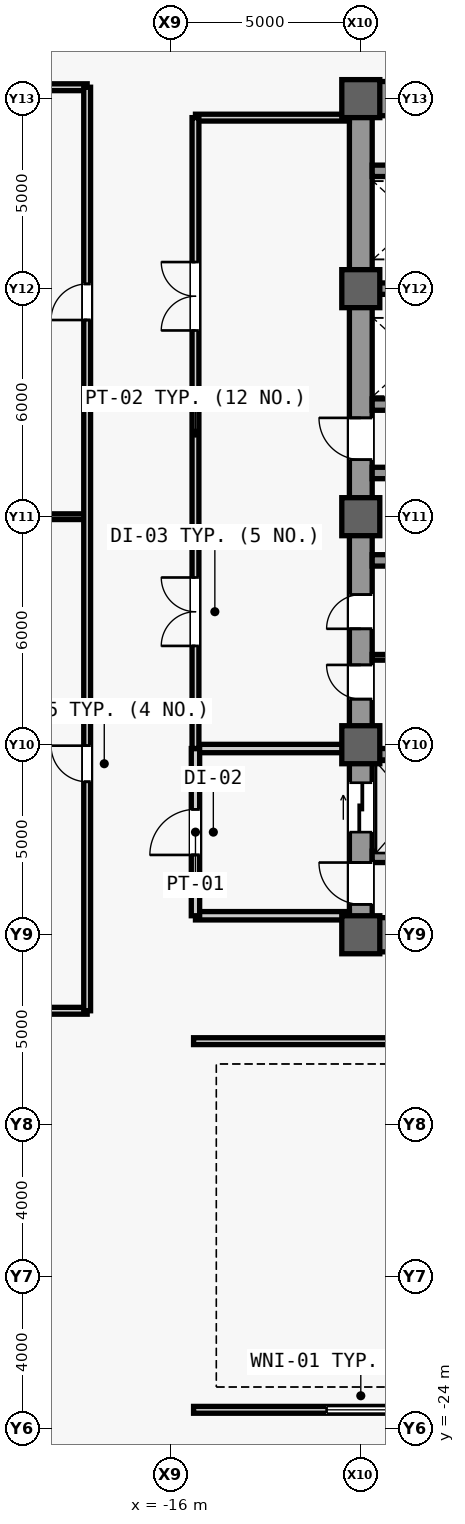
"""IFC4 building model, lengths in metres.
Left out: names, types, materials, properties, quantities, classifications, styles, units other than length and angle.
Written with IfcOpenShell. Run it as: python <this file> out.ifc"""

import sys

from ifc_helpers import new_model, si_unit, direction, frame, frame_2d, origin, origin_2d, place, context, subcontext, project, spatial, rectangle, extrude, source, transform, mapped, element, fill, save


model = new_model("IFC4")
c1 = context("Model", 3, precision=1e-05, world=origin(), true_north=direction((0.0, 1.0)))
c2 = subcontext(c1, "Body", "Model", "MODEL_VIEW")
j1 = project(units=[si_unit("LENGTHUNIT", "METRE"), si_unit("PLANEANGLEUNIT", "RADIAN")], contexts=[c1])
p1 = place(None, origin())
s1 = spatial("IfcSite", under=j1, at=p1, CompositionType="ELEMENT")
p2 = place(p1, origin())
s2 = spatial("IfcBuilding", under=s1, at=p2, CompositionType="ELEMENT")
p3 = place(p2, frame((0.0, 0.0, 17.4)))
s3 = spatial("IfcBuildingStorey", under=s2, at=p3, CompositionType="ELEMENT", Elevation=17.4)
m1 = source(origin(), c2, "Body", "SweptSolid", [
    extrude(rectangle(XDim=22.0, YDim=0.6, at=frame_2d((11.0, 0.0))), origin(), (0.0, 0.0, 1.0), 4.48),
])
p4 = place(p3, frame((-11.0, -11.0, 0.0), z_axis=(0.0, 0.0, 1.0), x_axis=(0.0, 1.0, 0.0)))
e1 = element("IfcWall", 1, at=p4, inside=s3, PredefinedType="SHEAR", context=c2, shape_type="MappedRepresentation", body=[
    mapped(m1, transform((0.0, 0.0, 0.0), scale=1.0)),
])
m2 = source(origin(), c2, "Body", "SweptSolid", [
    extrude(rectangle(XDim=1.1, YDim=2.2, at=frame_2d((0.55, 1.1))), frame((0.0, 0.31, 0.0), z_axis=(0.0, -1.0, 0.0), x_axis=(1.0, 0.0, 0.0)), (0.0, 0.0, 1.0), 0.62),
])
p5 = place(p4, frame((0.8, 0.0, 0.0)))
e2 = element("IfcOpeningElement", 2, at=p5, cuts=e1, PredefinedType="OPENING", context=c2, shape_type="MappedRepresentation", body=[
    mapped(m2, transform((0.0, 0.0, 0.0), scale=1.0)),
])
p6 = place(p4, frame((12.5, 0.0, 0.0)))
e3 = element("IfcOpeningElement", 3, at=p6, cuts=e1, PredefinedType="OPENING", context=c2, shape_type="MappedRepresentation", body=[
    mapped(m2, transform((0.0, 0.0, 0.0), scale=1.0)),
])
m3 = source(origin(), c2, "Body", "SweptSolid", [
    extrude(rectangle(XDim=0.9, YDim=2.15, at=frame_2d((0.45, 1.075))), frame((0.0, 0.31, 0.0), z_axis=(0.0, -1.0, 0.0), x_axis=(1.0, 0.0, 0.0)), (0.0, 0.0, 1.0), 0.62),
])
p7 = place(p4, frame((6.2, 0.0, 0.0)))
e4 = element("IfcOpeningElement", 4, at=p7, cuts=e1, PredefinedType="OPENING", context=c2, shape_type="MappedRepresentation", body=[
    mapped(m3, transform((0.0, 0.0, 0.0), scale=1.0)),
])
p8 = place(p4, frame((8.05, 0.0, 0.0)))
e5 = element("IfcOpeningElement", 5, at=p8, cuts=e1, PredefinedType="OPENING", context=c2, shape_type="MappedRepresentation", body=[
    mapped(m3, transform((0.0, 0.0, 0.0), scale=1.0)),
])
m4 = source(origin(), c2, "Body", "SweptSolid", [
    extrude(rectangle(XDim=1.3, YDim=2.3, at=frame_2d((0.65, 1.15))), frame((0.0, 0.31, 0.0), z_axis=(0.0, -1.0, 0.0), x_axis=(1.0, 0.0, 0.0)), (0.0, 0.0, 1.0), 0.62),
])
p9 = place(p4, frame((2.7, 0.0, 0.0)))
e6 = element("IfcOpeningElement", 6, at=p9, cuts=e1, PredefinedType="OPENING", context=c2, shape_type="MappedRepresentation", body=[
    mapped(m4, transform((0.0, 0.0, 0.0), scale=1.0)),
])
m5 = source(origin(), c2, "Body", "SweptSolid", [
    extrude(rectangle(XDim=5.85, YDim=0.9, at=frame_2d((2.925, 0.0))), origin(), (0.0, 0.0, 1.0), 4.48),
])
for number, where, z_axis, x_axis in (
    (7, (-10.7, -11.0, 0.0), (0.0, 0.0, 1.0), (1.0, 0.0, 0.0)),
    (8, (-10.7, 11.0, 0.0), (0.0, 0.0, 1.0), (1.0, 0.0, 0.0)),
):
    element("IfcWall", number, at=place(p3, frame(where, z_axis=z_axis, x_axis=x_axis)), inside=s3, PredefinedType="SHEAR", context=c2, shape_type="MappedRepresentation", body=[
        mapped(m5, transform((0.0, 0.0, 0.0), scale=1.0)),
    ])
m6 = source(origin(), c2, "Body", "SweptSolid", [
    extrude(rectangle(XDim=5.6, YDim=0.3, at=frame_2d((2.8, 0.0))), origin(), (0.0, 0.0, 1.0), 4.48),
])
for number, where, z_axis, x_axis in (
    (9, (-10.7, -1.15, 0.0), (0.0, 0.0, 1.0), (1.0, 0.0, 0.0)),
    (10, (-10.7, 1.15, 0.0), (0.0, 0.0, 1.0), (1.0, 0.0, 0.0)),
):
    element("IfcWall", number, at=place(p3, frame(where, z_axis=z_axis, x_axis=x_axis)), inside=s3, PredefinedType="SHEAR", context=c2, shape_type="MappedRepresentation", body=[
        mapped(m6, transform((0.0, 0.0, 0.0), scale=1.0)),
    ])
m7 = source(origin(), c2, "Body", "SweptSolid", [
    extrude(rectangle(XDim=1.0, YDim=1.0, at=origin_2d()), origin(), (0.0, 0.0, 1.0), 4.8),
])
for number, where, z_axis, x_axis in (
    (11, (-11.0, -11.0, 0.0), (0.0, 0.0, 1.0), (1.0, 0.0, 0.0)),
    (12, (-11.0, -6.0, 0.0), (0.0, 0.0, 1.0), (1.0, 0.0, 0.0)),
    (13, (-11.0, 0.0, 0.0), (0.0, 0.0, 1.0), (1.0, 0.0, 0.0)),
    (14, (-11.0, 6.0, 0.0), (0.0, 0.0, 1.0), (1.0, 0.0, 0.0)),
    (15, (-11.0, 11.0, 0.0), (0.0, 0.0, 1.0), (1.0, 0.0, 0.0)),
):
    element("IfcColumn", number, at=place(p3, frame(where, z_axis=z_axis, x_axis=x_axis)), inside=s3, PredefinedType="COLUMN", context=c2, shape_type="MappedRepresentation", body=[
        mapped(m7, transform((0.0, 0.0, 0.0), scale=1.0)),
    ])
m8 = source(origin(), c2, "Body", "SweptSolid", [
    extrude(rectangle(XDim=2.2, YDim=0.3, at=frame_2d((1.1, 0.0))), origin(), (0.0, 0.0, 1.0), 4.48),
])
for number, where, z_axis, x_axis in (
    (16, (-10.7, -8.95, 0.0), (0.0, 0.0, 1.0), (1.0, 0.0, 0.0)),
    (17, (-10.7, -6.25, 0.0), (0.0, 0.0, 1.0), (1.0, 0.0, 0.0)),
    (18, (-10.7, 2.95, 0.0), (0.0, 0.0, 1.0), (1.0, 0.0, 0.0)),
    (19, (-10.7, 6.0, 0.0), (0.0, 0.0, 1.0), (1.0, 0.0, 0.0)),
    (20, (-10.7, 9.1, 0.0), (0.0, 0.0, 1.0), (1.0, 0.0, 0.0)),
):
    element("IfcWall", number, at=place(p3, frame(where, z_axis=z_axis, x_axis=x_axis)), inside=s3, PredefinedType="SHEAR", context=c2, shape_type="MappedRepresentation", body=[
        mapped(m8, transform((0.0, 0.0, 0.0), scale=1.0)),
    ])
m9 = source(origin(), c2, "Body", "SweptSolid", [
    extrude(rectangle(XDim=2.05, YDim=0.15, at=frame_2d((1.025, 0.0))), origin(), (0.0, 0.0, 1.0), 4.48),
])
p10 = place(p3, frame((-10.7, -3.7, 0.0), z_axis=(0.0, 0.0, 1.0), x_axis=(1.0, 0.0, 0.0)))
e21 = element("IfcWall", 21, at=p10, inside=s3, PredefinedType="PARTITIONING", context=c2, shape_type="MappedRepresentation", body=[
    mapped(m9, transform((0.0, 0.0, 0.0), scale=1.0)),
])
m10 = source(origin(), c2, "Body", "SweptSolid", [
    extrude(rectangle(XDim=4.05, YDim=0.22, at=frame_2d((2.025, 0.0))), origin(), (0.0, 0.0, 1.0), 4.48),
])
for number, where, z_axis, x_axis in (
    (22, (-15.35, -10.5, 0.0), (0.0, 0.0, 1.0), (1.0, 0.0, 0.0)),
    (23, (-15.35, -6.1, 0.0), (0.0, 0.0, 1.0), (1.0, 0.0, 0.0)),
):
    element("IfcWall", number, at=place(p3, frame(where, z_axis=z_axis, x_axis=x_axis)), inside=s3, PredefinedType="PARTITIONING", context=c2, shape_type="MappedRepresentation", body=[
        mapped(m10, transform((0.0, 0.0, 0.0), scale=1.0)),
    ])
m11 = source(origin(), c2, "Body", "SweptSolid", [
    extrude(rectangle(XDim=4.4, YDim=0.22, at=frame_2d((2.2, 0.0))), origin(), (0.0, 0.0, 1.0), 4.48),
])
p11 = place(p3, frame((-15.35, -10.5, 0.0), z_axis=(0.0, 0.0, 1.0), x_axis=(0.0, 1.0, 0.0)))
e24 = element("IfcWall", 24, at=p11, inside=s3, PredefinedType="PARTITIONING", context=c2, shape_type="MappedRepresentation", body=[
    mapped(m11, transform((0.0, 0.0, 0.0), scale=1.0)),
])
m12 = source(origin(), c2, "Body", "SweptSolid", [
    extrude(rectangle(XDim=1.2, YDim=2.2, at=frame_2d((0.6, 1.1))), frame((0.0, 0.12, 0.0), z_axis=(0.0, -1.0, 0.0), x_axis=(1.0, 0.0, 0.0)), (0.0, 0.0, 1.0), 0.24),
])
p12 = place(p11, frame((1.6, 0.0, 0.0)))
e25 = element("IfcOpeningElement", 25, at=p12, cuts=e24, PredefinedType="OPENING", context=c2, shape_type="MappedRepresentation", body=[
    mapped(m12, transform((0.0, 0.0, 0.0), scale=1.0)),
])
m13 = source(origin(), c2, "Body", "SweptSolid", [
    extrude(rectangle(XDim=4.05, YDim=0.18, at=frame_2d((2.025, 0.0))), origin(), (0.0, 0.0, 1.0), 4.48),
])
p13 = place(p3, frame((-15.35, 10.5, 0.0), z_axis=(0.0, 0.0, 1.0), x_axis=(1.0, 0.0, 0.0)))
e26 = element("IfcWall", 26, at=p13, inside=s3, PredefinedType="PARTITIONING", context=c2, shape_type="MappedRepresentation", body=[
    mapped(m13, transform((0.0, 0.0, 0.0), scale=1.0)),
])
m14 = source(origin(), c2, "Body", "SweptSolid", [
    extrude(rectangle(XDim=16.6, YDim=0.18, at=frame_2d((8.3, 0.0))), origin(), (0.0, 0.0, 1.0), 4.48),
])
p14 = place(p3, frame((-15.35, -6.1, 0.0), z_axis=(0.0, 0.0, 1.0), x_axis=(0.0, 1.0, 0.0)))
e27 = element("IfcWall", 27, at=p14, inside=s3, PredefinedType="PARTITIONING", context=c2, shape_type="MappedRepresentation", body=[
    mapped(m14, transform((0.0, 0.0, 0.0), scale=1.0)),
])
m15 = source(origin(), c2, "Body", "SweptSolid", [
    extrude(rectangle(XDim=1.8, YDim=2.25, at=frame_2d((0.9, 1.125))), frame((0.0, 0.1, 0.0), z_axis=(0.0, -1.0, 0.0), x_axis=(1.0, 0.0, 0.0)), (0.0, 0.0, 1.0), 0.2),
])
p15 = place(p14, frame((2.7, 0.0, 0.0)))
e28 = element("IfcOpeningElement", 28, at=p15, cuts=e27, PredefinedType="OPENING", context=c2, shape_type="MappedRepresentation", body=[
    mapped(m15, transform((0.0, 0.0, 0.0), scale=1.0)),
])
p16 = place(p14, frame((11.0, 0.0, 0.0)))
e29 = element("IfcOpeningElement", 29, at=p16, cuts=e27, PredefinedType="OPENING", context=c2, shape_type="MappedRepresentation", body=[
    mapped(m15, transform((0.0, 0.0, 0.0), scale=1.0)),
])
m16 = source(origin(), c2, "Body", "SweptSolid", [
    extrude(rectangle(XDim=30.8, YDim=0.18, at=frame_2d((15.4, 0.0))), origin(), (0.0, 0.0, 1.0), 4.48),
])
p17 = place(p3, frame((-15.4, -13.8, 0.0), z_axis=(0.0, 0.0, 1.0), x_axis=(1.0, 0.0, 0.0)))
e30 = element("IfcWall", 30, at=p17, inside=s3, PredefinedType="PARTITIONING", context=c2, shape_type="MappedRepresentation", body=[
    mapped(m16, transform((0.0, 0.0, 0.0), scale=1.0)),
])
p18 = place(p17, frame((14.5, 0.0, 0.0)))
e31 = element("IfcOpeningElement", 31, at=p18, cuts=e30, PredefinedType="OPENING", context=c2, shape_type="MappedRepresentation", body=[
    mapped(m15, transform((0.0, 0.0, 0.0), scale=1.0)),
])
p19 = place(p3, frame((-15.4, -23.5, 0.0), z_axis=(0.0, 0.0, 1.0), x_axis=(1.0, 0.0, 0.0)))
e32 = element("IfcWall", 32, at=p19, inside=s3, PredefinedType="PARTITIONING", context=c2, shape_type="MappedRepresentation", body=[
    mapped(m16, transform((0.0, 0.0, 0.0), scale=1.0)),
])
m17 = source(origin(), c2, "Body", "SweptSolid", [
    extrude(rectangle(XDim=1.8, YDim=1.4, at=frame_2d((0.9, 0.7))), frame((0.0, 0.1, 0.0), z_axis=(0.0, -1.0, 0.0), x_axis=(1.0, 0.0, 0.0)), (0.0, 0.0, 1.0), 0.2),
])
p20 = place(p19, frame((3.5, 0.0, 0.9)))
e33 = element("IfcOpeningElement", 33, at=p20, cuts=e32, PredefinedType="OPENING", context=c2, shape_type="MappedRepresentation", body=[
    mapped(m17, transform((0.0, 0.0, 0.0), scale=1.0)),
])
p21 = place(p19, frame((14.5, 0.0, 0.9)))
e34 = element("IfcOpeningElement", 34, at=p21, cuts=e32, PredefinedType="OPENING", context=c2, shape_type="MappedRepresentation", body=[
    mapped(m17, transform((0.0, 0.0, 0.0), scale=1.0)),
])
p22 = place(p19, frame((23.7, 0.0, 0.9)))
e35 = element("IfcOpeningElement", 35, at=p22, cuts=e32, PredefinedType="OPENING", context=c2, shape_type="MappedRepresentation", body=[
    mapped(m17, transform((0.0, 0.0, 0.0), scale=1.0)),
])
m18 = source(origin(), c2, "Body", "SweptSolid", [
    extrude(rectangle(XDim=11.8, YDim=0.18, at=frame_2d((5.9, 0.0))), origin(), (0.0, 0.0, 1.0), 2.68),
])
p23 = place(p3, frame((-30.0, 11.3, 0.0), z_axis=(0.0, 0.0, 1.0), x_axis=(1.0, 0.0, 0.0)))
e36 = element("IfcWall", 36, at=p23, inside=s3, PredefinedType="PARTITIONING", context=c2, shape_type="MappedRepresentation", body=[
    mapped(m18, transform((0.0, 0.0, 0.0), scale=1.0)),
])
m19 = source(origin(), c2, "Body", "SweptSolid", [
    extrude(rectangle(XDim=21.8, YDim=0.18, at=frame_2d((10.9, 0.0))), origin(), (0.0, 0.0, 1.0), 4.48),
])
p24 = place(p3, frame((-40.0, -13.0, 0.0), z_axis=(0.0, 0.0, 1.0), x_axis=(1.0, 0.0, 0.0)))
e37 = element("IfcWall", 37, at=p24, inside=s3, PredefinedType="PARTITIONING", context=c2, shape_type="MappedRepresentation", body=[
    mapped(m19, transform((0.0, 0.0, 0.0), scale=1.0)),
])
m20 = source(origin(), c2, "Body", "SweptSolid", [
    extrude(rectangle(XDim=21.8, YDim=0.15, at=frame_2d((10.9, 0.0))), origin(), (0.0, 0.0, 1.0), 2.68),
])
p25 = place(p3, frame((-40.0, 0.0, 0.0), z_axis=(0.0, 0.0, 1.0), x_axis=(1.0, 0.0, 0.0)))
e38 = element("IfcWall", 38, at=p25, inside=s3, PredefinedType="PARTITIONING", context=c2, shape_type="MappedRepresentation", body=[
    mapped(m20, transform((0.0, 0.0, 0.0), scale=1.0)),
])
m21 = source(origin(), c2, "Body", "SweptSolid", [
    extrude(rectangle(XDim=24.3, YDim=0.18, at=frame_2d((12.15, 0.0))), origin(), (0.0, 0.0, 1.0), 4.48),
])
p26 = place(p3, frame((-18.2, -13.0, 0.0), z_axis=(0.0, 0.0, 1.0), x_axis=(0.0, 1.0, 0.0)))
e39 = element("IfcWall", 39, at=p26, inside=s3, PredefinedType="PARTITIONING", context=c2, shape_type="MappedRepresentation", body=[
    mapped(m21, transform((0.0, 0.0, 0.0), scale=1.0)),
])
m22 = source(origin(), c2, "Body", "SweptSolid", [
    extrude(rectangle(XDim=0.95, YDim=2.15, at=frame_2d((0.475, 1.075))), frame((0.0, 0.1, 0.0), z_axis=(0.0, -1.0, 0.0), x_axis=(1.0, 0.0, 0.0)), (0.0, 0.0, 1.0), 0.2),
])
p27 = place(p26, frame((6.025, 0.0, 0.0)))
e40 = element("IfcOpeningElement", 40, at=p27, cuts=e39, PredefinedType="OPENING", context=c2, shape_type="MappedRepresentation", body=[
    mapped(m22, transform((0.0, 0.0, 0.0), scale=1.0)),
])
p28 = place(p26, frame((18.175, 0.0, 0.0)))
e41 = element("IfcOpeningElement", 41, at=p28, cuts=e39, PredefinedType="OPENING", context=c2, shape_type="MappedRepresentation", body=[
    mapped(m22, transform((0.0, 0.0, 0.0), scale=1.0)),
])
m23 = source(origin(), c2, "Body", "SweptSolid", [
    extrude(rectangle(XDim=1.1, YDim=2.2, at=frame_2d((0.55, 1.1))), frame((0.0, 0.025, 0.0), z_axis=(0.0, -1.0, 0.0), x_axis=(1.0, 0.0, 0.0)), (0.0, 0.0, 1.0), 0.05),
])
p29 = place(p5, origin())
e42 = element("IfcDoor", 42, at=p29, inside=s3, OperationType="SINGLE_SWING_RIGHT", PredefinedType="DOOR", context=c2, shape_type="MappedRepresentation", body=[
    mapped(m23, transform((0.0, 0.0, 0.0), scale=1.0)),
])
fill(e2, e42)
p30 = place(p6, origin())
e43 = element("IfcDoor", 43, at=p30, inside=s3, OperationType="SINGLE_SWING_RIGHT", PredefinedType="DOOR", context=c2, shape_type="MappedRepresentation", body=[
    mapped(m23, transform((0.0, 0.0, 0.0), scale=1.0)),
])
fill(e3, e43)
m24 = source(origin(), c2, "Body", "SweptSolid", [
    extrude(rectangle(XDim=0.9, YDim=2.15, at=frame_2d((0.45, 1.075))), frame((0.0, 0.025, 0.0), z_axis=(0.0, -1.0, 0.0), x_axis=(1.0, 0.0, 0.0)), (0.0, 0.0, 1.0), 0.05),
])
p31 = place(p7, origin())
e44 = element("IfcDoor", 44, at=p31, inside=s3, OperationType="SINGLE_SWING_RIGHT", PredefinedType="DOOR", context=c2, shape_type="MappedRepresentation", body=[
    mapped(m24, transform((0.0, 0.0, 0.0), scale=1.0)),
])
fill(e4, e44)
p32 = place(p8, origin())
e45 = element("IfcDoor", 45, at=p32, inside=s3, OperationType="SINGLE_SWING_LEFT", PredefinedType="DOOR", context=c2, shape_type="MappedRepresentation", body=[
    mapped(m24, transform((0.0, 0.0, 0.0), scale=1.0)),
])
fill(e5, e45)
m25 = source(origin(), c2, "Body", "SweptSolid", [
    extrude(rectangle(XDim=1.2, YDim=2.2, at=frame_2d((0.6, 1.1))), frame((0.0, 0.025, 0.0), z_axis=(0.0, -1.0, 0.0), x_axis=(1.0, 0.0, 0.0)), (0.0, 0.0, 1.0), 0.05),
])
p33 = place(p12, origin())
e46 = element("IfcDoor", 46, at=p33, inside=s3, OperationType="SINGLE_SWING_LEFT", PredefinedType="DOOR", context=c2, shape_type="MappedRepresentation", body=[
    mapped(m25, transform((0.0, 0.0, 0.0), scale=1.0)),
])
fill(e25, e46)
m26 = source(origin(), c2, "Body", "SweptSolid", [
    extrude(rectangle(XDim=1.8, YDim=2.25, at=frame_2d((0.9, 1.125))), frame((0.0, 0.025, 0.0), z_axis=(0.0, -1.0, 0.0), x_axis=(1.0, 0.0, 0.0)), (0.0, 0.0, 1.0), 0.05),
])
p34 = place(p15, origin())
e47 = element("IfcDoor", 47, at=p34, inside=s3, OperationType="SINGLE_SWING_LEFT", PredefinedType="DOOR", context=c2, shape_type="MappedRepresentation", body=[
    mapped(m26, transform((0.0, 0.0, 0.0), scale=1.0)),
])
fill(e28, e47)
p35 = place(p16, origin())
e48 = element("IfcDoor", 48, at=p35, inside=s3, OperationType="SINGLE_SWING_RIGHT", PredefinedType="DOOR", context=c2, shape_type="MappedRepresentation", body=[
    mapped(m26, transform((0.0, 0.0, 0.0), scale=1.0)),
])
fill(e29, e48)
m27 = source(origin(), c2, "Body", "SweptSolid", [
    extrude(rectangle(XDim=0.95, YDim=2.15, at=frame_2d((0.475, 1.075))), frame((0.0, 0.025, 0.0), z_axis=(0.0, -1.0, 0.0), x_axis=(1.0, 0.0, 0.0)), (0.0, 0.0, 1.0), 0.05),
])
p36 = place(p27, origin())
e49 = element("IfcDoor", 49, at=p36, inside=s3, OperationType="SINGLE_SWING_RIGHT", PredefinedType="DOOR", context=c2, shape_type="MappedRepresentation", body=[
    mapped(m27, transform((0.0, 0.0, 0.0), scale=1.0)),
])
fill(e40, e49)
p37 = place(p28, origin())
e50 = element("IfcDoor", 50, at=p37, inside=s3, OperationType="SINGLE_SWING_LEFT", PredefinedType="DOOR", context=c2, shape_type="MappedRepresentation", body=[
    mapped(m27, transform((0.0, 0.0, 0.0), scale=1.0)),
])
fill(e41, e50)
m28 = source(origin(), c2, "Body", "SweptSolid", [
    extrude(rectangle(XDim=1.8, YDim=1.4, at=frame_2d((0.9, 0.7))), frame((0.0, 0.03, 0.0), z_axis=(0.0, -1.0, 0.0), x_axis=(1.0, 0.0, 0.0)), (0.0, 0.0, 1.0), 0.06),
])
p38 = place(p20, origin())
e51 = element("IfcWindow", 51, at=p38, inside=s3, PartitioningType="SINGLE_PANEL", PredefinedType="WINDOW", context=c2, shape_type="MappedRepresentation", body=[
    mapped(m28, transform((0.0, 0.0, 0.0), scale=1.0)),
])
fill(e33, e51)
m29 = source(origin(), c2, "Body", "SweptSolid", [
    extrude(rectangle(XDim=1.3, YDim=2.3, at=frame_2d((0.65, 1.15))), frame((0.0, 0.025, 0.0), z_axis=(0.0, -1.0, 0.0), x_axis=(1.0, 0.0, 0.0)), (0.0, 0.0, 1.0), 0.05),
])
p39 = place(p9, origin())
e52 = element("IfcDoor", 52, at=p39, inside=s3, OperationType="SLIDING_TO_LEFT", PredefinedType="DOOR", context=c2, shape_type="MappedRepresentation", body=[
    mapped(m29, transform((0.0, 0.0, 0.0), scale=1.0)),
])
fill(e6, e52)
save(model, sys.argv[1])
